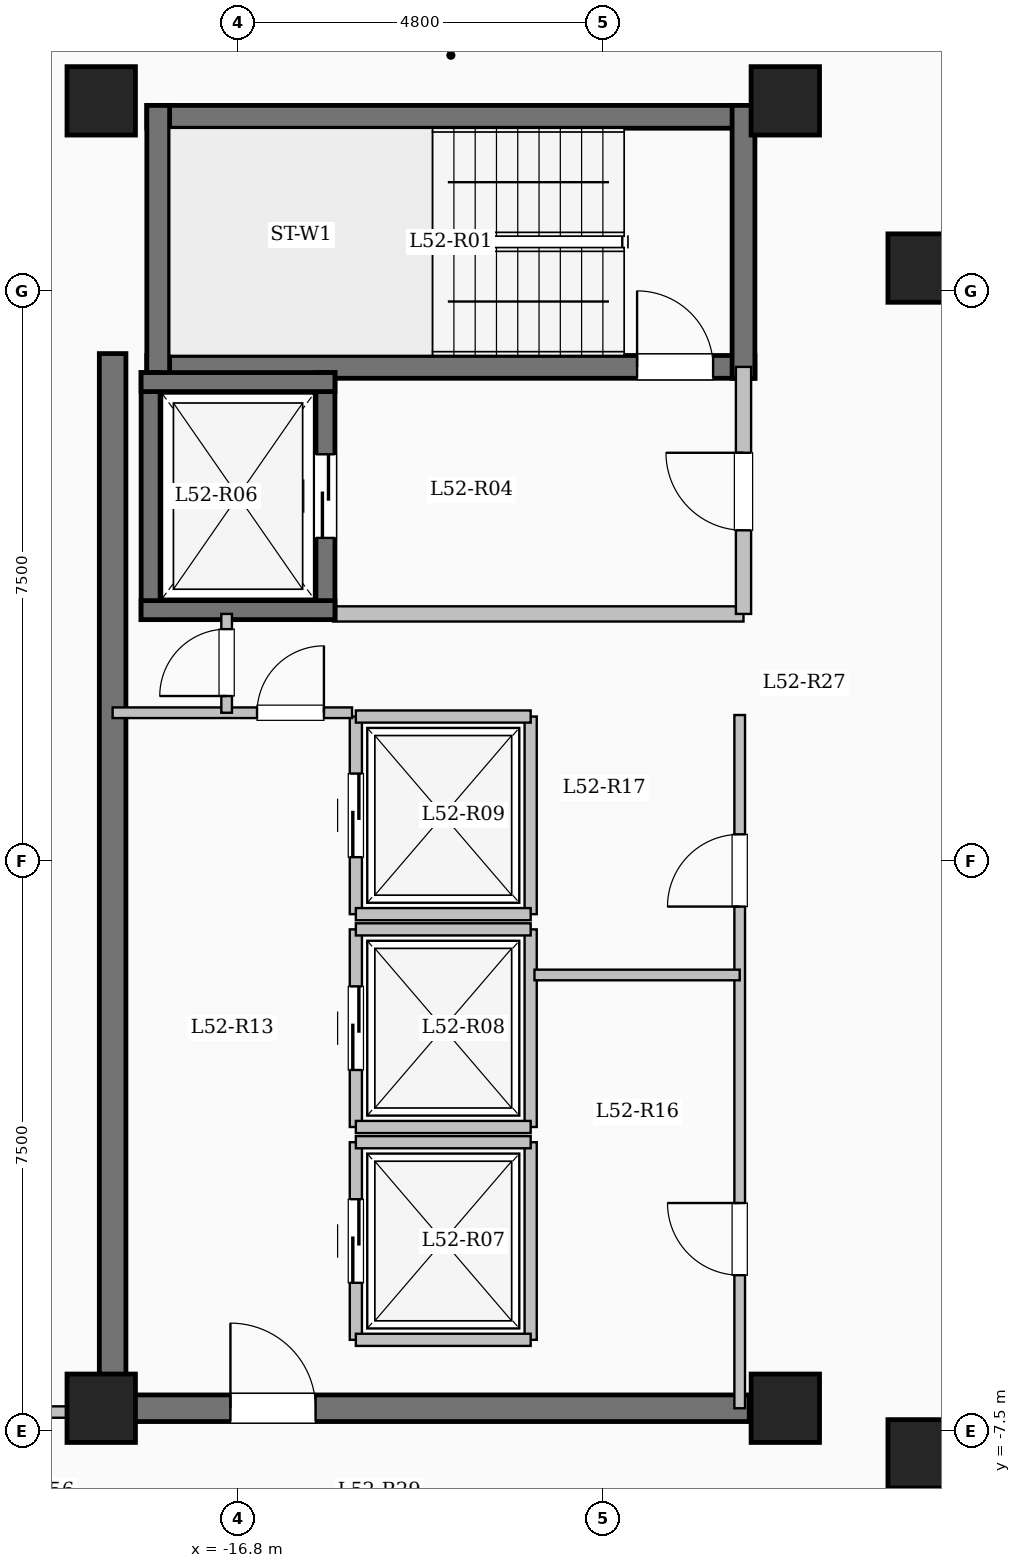
"""IFC4 building model, lengths in metres.
Left out: names, types, materials, properties, quantities, classifications, styles, units other than length and angle.
Written with IfcOpenShell. Run it as: python <this file> out.ifc"""

import sys

from ifc_helpers import new_model, si_unit, direction, frame, frame_2d, origin, origin_2d, place, context, subcontext, project, spatial, rectangle, extrude, element, fill, save


model = new_model("IFC4")
c1 = context("Model", 3, precision=1e-05, world=origin(), true_north=direction((0.0, 1.0)))
c2 = subcontext(c1, "Body", "Model", "MODEL_VIEW")
j1 = project(units=[si_unit("LENGTHUNIT", "METRE"), si_unit("PLANEANGLEUNIT", "RADIAN")], contexts=[c1])
p1 = place(None, origin())
s1 = spatial("IfcSite", under=j1, at=p1, CompositionType="ELEMENT")
p2 = place(p1, origin())
s2 = spatial("IfcBuilding", under=s1, at=p2, CompositionType="ELEMENT")
p3 = place(p2, frame((0.0, 0.0, 193.6)))
s3 = spatial("IfcBuildingStorey", under=s2, at=p3, CompositionType="ELEMENT", Elevation=193.6)
for number, where, z_axis, x_axis in (
    (1, (-7.8, -7.8, 0.0), (0.0, 0.0, 1.0), (1.0, 0.0, 0.0)),
    (2, (-7.8, 7.8, 0.0), (0.0, 0.0, 1.0), (1.0, 0.0, 0.0)),
    (3, (-9.6, -7.2, 0.0), (0.0, 0.0, 1.0), (1.0, 0.0, 0.0)),
    (4, (-9.6, 10.0, 0.0), (0.0, 0.0, 1.0), (1.0, 0.0, 0.0)),
    (5, (-18.6, -7.2, 0.0), (0.0, 0.0, 1.0), (1.0, 0.0, 0.0)),
    (6, (-18.6, 10.0, 0.0), (0.0, 0.0, 1.0), (1.0, 0.0, 0.0)),
):
    element("IfcColumn", number, at=place(p3, frame(where, z_axis=z_axis, x_axis=x_axis)), inside=s3, PredefinedType="COLUMN", context=c2, shape_type="SweptSolid", body=[
        extrude(rectangle(XDim=0.9, YDim=0.9, at=origin_2d()), origin(), (0.0, 0.0, 1.0), 3.35),
    ])
p4 = place(p3, frame((-18.0, 9.79, 0.0), z_axis=(0.0, 0.0, 1.0), x_axis=(1.0, 0.0, 0.0)))
e7 = element("IfcWall", 7, at=p4, inside=s3, PredefinedType="SHEAR", context=c2, shape_type="SweptSolid", body=[
    extrude(rectangle(XDim=8.0, YDim=0.3, at=frame_2d((4.0, 0.0))), origin(), (0.0, 0.0, 1.0), 3.35),
])
p5 = place(p3, frame((-18.0, 6.5, 0.0), z_axis=(0.0, 0.0, 1.0), x_axis=(1.0, 0.0, 0.0)))
e8 = element("IfcWall", 8, at=p5, inside=s3, PredefinedType="SHEAR", context=c2, shape_type="SweptSolid", body=[
    extrude(rectangle(XDim=8.0, YDim=0.3, at=frame_2d((4.0, 0.0))), origin(), (0.0, 0.0, 1.0), 3.35),
])
p6 = place(p5, frame((6.45, 0.0, 0.0)))
e9 = element("IfcOpeningElement", 9, at=p6, cuts=e8, PredefinedType="OPENING", context=c2, shape_type="SweptSolid", body=[
    extrude(rectangle(XDim=1.0, YDim=2.15, at=frame_2d((0.5, 1.075))), frame((0.0, 0.16, 0.0), z_axis=(0.0, -1.0, 0.0), x_axis=(1.0, 0.0, 0.0)), (0.0, 0.0, 1.0), 0.32),
])
for number, where, z_axis, x_axis in (
    (10, (-17.85, 6.35, 0.0), (0.0, 0.0, 1.0), (0.0, 1.0, 0.0)),
    (11, (-10.15, 6.35, 0.0), (0.0, 0.0, 1.0), (0.0, 1.0, 0.0)),
):
    element("IfcWall", number, at=place(p3, frame(where, z_axis=z_axis, x_axis=x_axis)), inside=s3, PredefinedType="SHEAR", context=c2, shape_type="SweptSolid", body=[
        extrude(rectangle(XDim=3.59, YDim=0.3, at=frame_2d((1.795, 0.0))), origin(), (0.0, 0.0, 1.0), 3.35),
    ])
p7 = place(p3, frame((-15.55, 3.25, 0.0), z_axis=(0.0, 0.0, 1.0), x_axis=(1.0, 0.0, 0.0)))
e12 = element("IfcWall", 12, at=p7, inside=s3, PredefinedType="SOLIDWALL", context=c2, shape_type="SweptSolid", body=[
    extrude(rectangle(XDim=5.4, YDim=0.2, at=frame_2d((2.7, 0.0))), origin(), (0.0, 0.0, 1.0), 3.1),
])
p8 = place(p3, frame((-10.15, 3.25, 0.0), z_axis=(0.0, 0.0, 1.0), x_axis=(0.0, 1.0, 0.0)))
e13 = element("IfcWall", 13, at=p8, inside=s3, PredefinedType="SOLIDWALL", context=c2, shape_type="SweptSolid", body=[
    extrude(rectangle(XDim=3.25, YDim=0.2, at=frame_2d((1.625, 0.0))), origin(), (0.0, 0.0, 1.0), 3.1),
])
p9 = place(p8, frame((1.1, 0.0, 0.0)))
e14 = element("IfcOpeningElement", 14, at=p9, cuts=e13, PredefinedType="OPENING", context=c2, shape_type="SweptSolid", body=[
    extrude(rectangle(XDim=1.02, YDim=2.15, at=frame_2d((0.51, 1.075))), frame((0.0, 0.11, 0.0), z_axis=(0.0, -1.0, 0.0), x_axis=(1.0, 0.0, 0.0)), (0.0, 0.0, 1.0), 0.22),
])
p10 = place(p3, frame((-17.95, 3.175, 0.0), z_axis=(0.0, 0.0, 1.0), x_axis=(0.0, 1.0, 0.0)))
e15 = element("IfcWall", 15, at=p10, inside=s3, PredefinedType="SHEAR", context=c2, shape_type="SweptSolid", body=[
    extrude(rectangle(XDim=3.25, YDim=0.25, at=frame_2d((1.625, 0.0))), origin(), (0.0, 0.0, 1.0), 3.35),
])
p11 = place(p3, frame((-15.65, 3.175, 0.0), z_axis=(0.0, 0.0, 1.0), x_axis=(0.0, 1.0, 0.0)))
e16 = element("IfcWall", 16, at=p11, inside=s3, PredefinedType="SHEAR", context=c2, shape_type="SweptSolid", body=[
    extrude(rectangle(XDim=3.25, YDim=0.25, at=frame_2d((1.625, 0.0))), origin(), (0.0, 0.0, 1.0), 3.35),
])
p12 = place(p11, frame((1.075, 0.0, 0.0)))
e17 = element("IfcOpeningElement", 17, at=p12, cuts=e16, PredefinedType="OPENING", context=c2, shape_type="SweptSolid", body=[
    extrude(rectangle(XDim=1.1, YDim=2.15, at=frame_2d((0.55, 1.075))), frame((0.0, 0.135, 0.0), z_axis=(0.0, -1.0, 0.0), x_axis=(1.0, 0.0, 0.0)), (0.0, 0.0, 1.0), 0.27),
])
for number, where, z_axis, x_axis in (
    (18, (-18.075, 3.3, 0.0), (0.0, 0.0, 1.0), (1.0, 0.0, 0.0)),
    (19, (-18.075, 6.3, 0.0), (0.0, 0.0, 1.0), (1.0, 0.0, 0.0)),
):
    element("IfcWall", number, at=place(p3, frame(where, z_axis=z_axis, x_axis=x_axis)), inside=s3, PredefinedType="SHEAR", context=c2, shape_type="SweptSolid", body=[
        extrude(rectangle(XDim=2.55, YDim=0.25, at=frame_2d((1.275, 0.0))), origin(), (0.0, 0.0, 1.0), 3.35),
    ])
p13 = place(p3, frame((-15.25, -6.3, 0.0), z_axis=(0.0, 0.0, 1.0), x_axis=(0.0, 1.0, 0.0)))
e20 = element("IfcWall", 20, at=p13, inside=s3, PredefinedType="SOLIDWALL", context=c2, shape_type="SweptSolid", body=[
    extrude(rectangle(XDim=2.6, YDim=0.16, at=frame_2d((1.3, 0.0))), origin(), (0.0, 0.0, 1.0), 3.1),
])
p14 = place(p13, frame((0.75, 0.0, 0.0)))
e21 = element("IfcOpeningElement", 21, at=p14, cuts=e20, PredefinedType="OPENING", context=c2, shape_type="SweptSolid", body=[
    extrude(rectangle(XDim=1.1, YDim=2.15, at=frame_2d((0.55, 1.075))), frame((0.0, 0.09, 0.0), z_axis=(0.0, -1.0, 0.0), x_axis=(1.0, 0.0, 0.0)), (0.0, 0.0, 1.0), 0.18),
])
p15 = place(p3, frame((-12.95, -6.3, 0.0), z_axis=(0.0, 0.0, 1.0), x_axis=(0.0, 1.0, 0.0)))
e22 = element("IfcWall", 22, at=p15, inside=s3, PredefinedType="SOLIDWALL", context=c2, shape_type="SweptSolid", body=[
    extrude(rectangle(XDim=2.6, YDim=0.16, at=frame_2d((1.3, 0.0))), origin(), (0.0, 0.0, 1.0), 3.1),
])
for number, where, z_axis, x_axis in (
    (23, (-15.25, -6.3, 0.0), (0.0, 0.0, 1.0), (1.0, 0.0, 0.0)),
    (24, (-15.25, -3.7, 0.0), (0.0, 0.0, 1.0), (1.0, 0.0, 0.0)),
):
    element("IfcWall", number, at=place(p3, frame(where, z_axis=z_axis, x_axis=x_axis)), inside=s3, PredefinedType="SOLIDWALL", context=c2, shape_type="SweptSolid", body=[
        extrude(rectangle(XDim=2.3, YDim=0.16, at=frame_2d((1.15, 0.0))), origin(), (0.0, 0.0, 1.0), 3.1),
    ])
p16 = place(p3, frame((-15.25, -3.5, 0.0), z_axis=(0.0, 0.0, 1.0), x_axis=(0.0, 1.0, 0.0)))
e25 = element("IfcWall", 25, at=p16, inside=s3, PredefinedType="SOLIDWALL", context=c2, shape_type="SweptSolid", body=[
    extrude(rectangle(XDim=2.6, YDim=0.16, at=frame_2d((1.3, 0.0))), origin(), (0.0, 0.0, 1.0), 3.1),
])
p17 = place(p16, frame((0.75, 0.0, 0.0)))
e26 = element("IfcOpeningElement", 26, at=p17, cuts=e25, PredefinedType="OPENING", context=c2, shape_type="SweptSolid", body=[
    extrude(rectangle(XDim=1.1, YDim=2.15, at=frame_2d((0.55, 1.075))), frame((0.0, 0.09, 0.0), z_axis=(0.0, -1.0, 0.0), x_axis=(1.0, 0.0, 0.0)), (0.0, 0.0, 1.0), 0.18),
])
p18 = place(p3, frame((-12.95, -3.5, 0.0), z_axis=(0.0, 0.0, 1.0), x_axis=(0.0, 1.0, 0.0)))
e27 = element("IfcWall", 27, at=p18, inside=s3, PredefinedType="SOLIDWALL", context=c2, shape_type="SweptSolid", body=[
    extrude(rectangle(XDim=2.6, YDim=0.16, at=frame_2d((1.3, 0.0))), origin(), (0.0, 0.0, 1.0), 3.1),
])
for number, where, z_axis, x_axis in (
    (28, (-15.25, -3.5, 0.0), (0.0, 0.0, 1.0), (1.0, 0.0, 0.0)),
    (29, (-15.25, -0.9, 0.0), (0.0, 0.0, 1.0), (1.0, 0.0, 0.0)),
):
    element("IfcWall", number, at=place(p3, frame(where, z_axis=z_axis, x_axis=x_axis)), inside=s3, PredefinedType="SOLIDWALL", context=c2, shape_type="SweptSolid", body=[
        extrude(rectangle(XDim=2.3, YDim=0.16, at=frame_2d((1.15, 0.0))), origin(), (0.0, 0.0, 1.0), 3.1),
    ])
p19 = place(p3, frame((-15.25, -0.7, 0.0), z_axis=(0.0, 0.0, 1.0), x_axis=(0.0, 1.0, 0.0)))
e30 = element("IfcWall", 30, at=p19, inside=s3, PredefinedType="SOLIDWALL", context=c2, shape_type="SweptSolid", body=[
    extrude(rectangle(XDim=2.6, YDim=0.16, at=frame_2d((1.3, 0.0))), origin(), (0.0, 0.0, 1.0), 3.1),
])
p20 = place(p19, frame((0.75, 0.0, 0.0)))
e31 = element("IfcOpeningElement", 31, at=p20, cuts=e30, PredefinedType="OPENING", context=c2, shape_type="SweptSolid", body=[
    extrude(rectangle(XDim=1.1, YDim=2.15, at=frame_2d((0.55, 1.075))), frame((0.0, 0.09, 0.0), z_axis=(0.0, -1.0, 0.0), x_axis=(1.0, 0.0, 0.0)), (0.0, 0.0, 1.0), 0.18),
])
p21 = place(p3, frame((-12.95, -0.7, 0.0), z_axis=(0.0, 0.0, 1.0), x_axis=(0.0, 1.0, 0.0)))
e32 = element("IfcWall", 32, at=p21, inside=s3, PredefinedType="SOLIDWALL", context=c2, shape_type="SweptSolid", body=[
    extrude(rectangle(XDim=2.6, YDim=0.16, at=frame_2d((1.3, 0.0))), origin(), (0.0, 0.0, 1.0), 3.1),
])
for number, where, z_axis, x_axis in (
    (33, (-15.25, -0.7, 0.0), (0.0, 0.0, 1.0), (1.0, 0.0, 0.0)),
    (34, (-15.25, 1.9, 0.0), (0.0, 0.0, 1.0), (1.0, 0.0, 0.0)),
):
    element("IfcWall", number, at=place(p3, frame(where, z_axis=z_axis, x_axis=x_axis)), inside=s3, PredefinedType="SOLIDWALL", context=c2, shape_type="SweptSolid", body=[
        extrude(rectangle(XDim=2.3, YDim=0.16, at=frame_2d((1.15, 0.0))), origin(), (0.0, 0.0, 1.0), 3.1),
    ])
p22 = place(p3, frame((-18.45, -7.375, 0.0), z_axis=(0.0, 0.0, 1.0), x_axis=(0.0, 1.0, 0.0)))
e35 = element("IfcWall", 35, at=p22, inside=s3, PredefinedType="SHEAR", context=c2, shape_type="SweptSolid", body=[
    extrude(rectangle(XDim=14.05, YDim=0.35, at=frame_2d((7.025, 0.0))), origin(), (0.0, 0.0, 1.0), 3.35),
])
p23 = place(p3, frame((-18.625, -7.2, 0.0), z_axis=(0.0, 0.0, 1.0), x_axis=(1.0, 0.0, 0.0)))
e36 = element("IfcWall", 36, at=p23, inside=s3, PredefinedType="SHEAR", context=c2, shape_type="SweptSolid", body=[
    extrude(rectangle(XDim=8.55, YDim=0.35, at=frame_2d((4.275, 0.0))), origin(), (0.0, 0.0, 1.0), 3.35),
])
p24 = place(p23, frame((1.725, 0.0, 0.0)))
e37 = element("IfcOpeningElement", 37, at=p24, cuts=e36, PredefinedType="OPENING", context=c2, shape_type="SweptSolid", body=[
    extrude(rectangle(XDim=1.12, YDim=2.15, at=frame_2d((0.56, 1.075))), frame((0.0, 0.185, 0.0), z_axis=(0.0, -1.0, 0.0), x_axis=(1.0, 0.0, 0.0)), (0.0, 0.0, 1.0), 0.37),
])
p25 = place(p3, frame((-18.45, 1.95, 0.0), z_axis=(0.0, 0.0, 1.0), x_axis=(1.0, 0.0, 0.0)))
e38 = element("IfcWall", 38, at=p25, inside=s3, PredefinedType="PARTITIONING", context=c2, shape_type="SweptSolid", body=[
    extrude(rectangle(XDim=3.15, YDim=0.14, at=frame_2d((1.575, 0.0))), origin(), (0.0, 0.0, 1.0), 3.1),
])
p26 = place(p25, frame((1.9, 0.0, 0.0)))
e39 = element("IfcOpeningElement", 39, at=p26, cuts=e38, PredefinedType="OPENING", context=c2, shape_type="SweptSolid", body=[
    extrude(rectangle(XDim=0.88, YDim=2.1, at=frame_2d((0.44, 1.05))), frame((0.0, 0.08, 0.0), z_axis=(0.0, -1.0, 0.0), x_axis=(1.0, 0.0, 0.0)), (0.0, 0.0, 1.0), 0.16),
])
p27 = place(p3, frame((-16.95, 1.95, 0.0), z_axis=(0.0, 0.0, 1.0), x_axis=(0.0, 1.0, 0.0)))
e40 = element("IfcWall", 40, at=p27, inside=s3, PredefinedType="PARTITIONING", context=c2, shape_type="SweptSolid", body=[
    extrude(rectangle(XDim=1.3, YDim=0.14, at=frame_2d((0.65, 0.0))), origin(), (0.0, 0.0, 1.0), 3.1),
])
p28 = place(p27, frame((0.22, 0.0, 0.0)))
e41 = element("IfcOpeningElement", 41, at=p28, cuts=e40, PredefinedType="OPENING", context=c2, shape_type="SweptSolid", body=[
    extrude(rectangle(XDim=0.88, YDim=2.1, at=frame_2d((0.44, 1.05))), frame((0.0, 0.08, 0.0), z_axis=(0.0, -1.0, 0.0), x_axis=(1.0, 0.0, 0.0)), (0.0, 0.0, 1.0), 0.16),
])
p29 = place(p3, frame((-10.2, -7.2, 0.0), z_axis=(0.0, 0.0, 1.0), x_axis=(0.0, 1.0, 0.0)))
e42 = element("IfcWall", 42, at=p29, inside=s3, PredefinedType="PARTITIONING", context=c2, shape_type="SweptSolid", body=[
    extrude(rectangle(XDim=9.12, YDim=0.14, at=frame_2d((4.56, 0.0))), origin(), (0.0, 0.0, 1.0), 3.1),
])
p30 = place(p29, frame((1.75, 0.0, 0.0)))
e43 = element("IfcOpeningElement", 43, at=p30, cuts=e42, PredefinedType="OPENING", context=c2, shape_type="SweptSolid", body=[
    extrude(rectangle(XDim=0.95, YDim=2.12, at=frame_2d((0.475, 1.06))), frame((0.0, 0.08, 0.0), z_axis=(0.0, -1.0, 0.0), x_axis=(1.0, 0.0, 0.0)), (0.0, 0.0, 1.0), 0.16),
])
p31 = place(p29, frame((6.6, 0.0, 0.0)))
e44 = element("IfcOpeningElement", 44, at=p31, cuts=e42, PredefinedType="OPENING", context=c2, shape_type="SweptSolid", body=[
    extrude(rectangle(XDim=0.95, YDim=2.12, at=frame_2d((0.475, 1.06))), frame((0.0, 0.08, 0.0), z_axis=(0.0, -1.0, 0.0), x_axis=(1.0, 0.0, 0.0)), (0.0, 0.0, 1.0), 0.16),
])
p32 = place(p3, frame((-12.9, -1.5, 0.0), z_axis=(0.0, 0.0, 1.0), x_axis=(1.0, 0.0, 0.0)))
e45 = element("IfcWall", 45, at=p32, inside=s3, PredefinedType="PARTITIONING", context=c2, shape_type="SweptSolid", body=[
    extrude(rectangle(XDim=2.7, YDim=0.14, at=frame_2d((1.35, 0.0))), origin(), (0.0, 0.0, 1.0), 3.1),
])
p33 = place(p3, frame((-23.58, -7.25, 0.0), z_axis=(0.0, 0.0, 1.0), x_axis=(1.0, 0.0, 0.0)))
e46 = element("IfcWall", 46, at=p33, inside=s3, PredefinedType="PARTITIONING", context=c2, shape_type="SweptSolid", body=[
    extrude(rectangle(XDim=5.13, YDim=0.15, at=frame_2d((2.565, 0.0))), origin(), (0.0, 0.0, 1.0), 3.1),
])
p34 = place(p33, frame((2.08, 0.0, 0.0)))
e47 = element("IfcOpeningElement", 47, at=p34, cuts=e46, PredefinedType="OPENING", context=c2, shape_type="SweptSolid", body=[
    extrude(rectangle(XDim=1.08, YDim=2.15, at=frame_2d((0.54, 1.075))), frame((0.0, 0.085, 0.0), z_axis=(0.0, -1.0, 0.0), x_axis=(1.0, 0.0, 0.0)), (0.0, 0.0, 1.0), 0.17),
])
p35 = place(p6, origin())
e48 = element("IfcDoor", 48, at=p35, inside=s3, OperationType="SINGLE_SWING_LEFT", PredefinedType="DOOR", context=c2, shape_type="SweptSolid", body=[
    extrude(rectangle(XDim=1.0, YDim=2.15, at=frame_2d((0.5, 1.075))), frame((0.0, 0.025, 0.0), z_axis=(0.0, -1.0, 0.0), x_axis=(1.0, 0.0, 0.0)), (0.0, 0.0, 1.0), 0.05),
])
fill(e9, e48)
p36 = place(p9, origin())
e49 = element("IfcDoor", 49, at=p36, inside=s3, OperationType="SINGLE_SWING_RIGHT", PredefinedType="DOOR", context=c2, shape_type="SweptSolid", body=[
    extrude(rectangle(XDim=1.02, YDim=2.15, at=frame_2d((0.51, 1.075))), frame((0.0, 0.025, 0.0), z_axis=(0.0, -1.0, 0.0), x_axis=(1.0, 0.0, 0.0)), (0.0, 0.0, 1.0), 0.05),
])
fill(e14, e49)
p37 = place(p12, origin())
e50 = element("IfcDoor", 50, at=p37, inside=s3, OperationType="SLIDING_TO_LEFT", PredefinedType="DOOR", context=c2, shape_type="SweptSolid", body=[
    extrude(rectangle(XDim=1.1, YDim=2.15, at=frame_2d((0.55, 1.075))), frame((0.0, 0.025, 0.0), z_axis=(0.0, -1.0, 0.0), x_axis=(1.0, 0.0, 0.0)), (0.0, 0.0, 1.0), 0.05),
])
fill(e17, e50)
p38 = place(p14, origin())
e51 = element("IfcDoor", 51, at=p38, inside=s3, OperationType="SLIDING_TO_LEFT", PredefinedType="DOOR", context=c2, shape_type="SweptSolid", body=[
    extrude(rectangle(XDim=1.1, YDim=2.15, at=frame_2d((0.55, 1.075))), frame((0.0, 0.025, 0.0), z_axis=(0.0, -1.0, 0.0), x_axis=(1.0, 0.0, 0.0)), (0.0, 0.0, 1.0), 0.05),
])
fill(e21, e51)
p39 = place(p17, origin())
e52 = element("IfcDoor", 52, at=p39, inside=s3, OperationType="SLIDING_TO_LEFT", PredefinedType="DOOR", context=c2, shape_type="SweptSolid", body=[
    extrude(rectangle(XDim=1.1, YDim=2.15, at=frame_2d((0.55, 1.075))), frame((0.0, 0.025, 0.0), z_axis=(0.0, -1.0, 0.0), x_axis=(1.0, 0.0, 0.0)), (0.0, 0.0, 1.0), 0.05),
])
fill(e26, e52)
p40 = place(p20, origin())
e53 = element("IfcDoor", 53, at=p40, inside=s3, OperationType="SLIDING_TO_LEFT", PredefinedType="DOOR", context=c2, shape_type="SweptSolid", body=[
    extrude(rectangle(XDim=1.1, YDim=2.15, at=frame_2d((0.55, 1.075))), frame((0.0, 0.025, 0.0), z_axis=(0.0, -1.0, 0.0), x_axis=(1.0, 0.0, 0.0)), (0.0, 0.0, 1.0), 0.05),
])
fill(e31, e53)
p41 = place(p24, origin())
e54 = element("IfcDoor", 54, at=p41, inside=s3, OperationType="SINGLE_SWING_LEFT", PredefinedType="DOOR", context=c2, shape_type="SweptSolid", body=[
    extrude(rectangle(XDim=1.12, YDim=2.15, at=frame_2d((0.56, 1.075))), frame((0.0, 0.025, 0.0), z_axis=(0.0, -1.0, 0.0), x_axis=(1.0, 0.0, 0.0)), (0.0, 0.0, 1.0), 0.05),
])
fill(e37, e54)
p42 = place(p26, origin())
e55 = element("IfcDoor", 55, at=p42, inside=s3, OperationType="SINGLE_SWING_RIGHT", PredefinedType="DOOR", context=c2, shape_type="SweptSolid", body=[
    extrude(rectangle(XDim=0.88, YDim=2.1, at=frame_2d((0.44, 1.05))), frame((0.0, 0.025, 0.0), z_axis=(0.0, -1.0, 0.0), x_axis=(1.0, 0.0, 0.0)), (0.0, 0.0, 1.0), 0.05),
])
fill(e39, e55)
p43 = place(p28, origin())
e56 = element("IfcDoor", 56, at=p43, inside=s3, OperationType="SINGLE_SWING_LEFT", PredefinedType="DOOR", context=c2, shape_type="SweptSolid", body=[
    extrude(rectangle(XDim=0.88, YDim=2.1, at=frame_2d((0.44, 1.05))), frame((0.0, 0.025, 0.0), z_axis=(0.0, -1.0, 0.0), x_axis=(1.0, 0.0, 0.0)), (0.0, 0.0, 1.0), 0.05),
])
fill(e41, e56)
p44 = place(p30, origin())
e57 = element("IfcDoor", 57, at=p44, inside=s3, OperationType="SINGLE_SWING_RIGHT", PredefinedType="DOOR", context=c2, shape_type="SweptSolid", body=[
    extrude(rectangle(XDim=0.95, YDim=2.12, at=frame_2d((0.475, 1.06))), frame((0.0, 0.025, 0.0), z_axis=(0.0, -1.0, 0.0), x_axis=(1.0, 0.0, 0.0)), (0.0, 0.0, 1.0), 0.05),
])
fill(e43, e57)
p45 = place(p31, origin())
e58 = element("IfcDoor", 58, at=p45, inside=s3, OperationType="SINGLE_SWING_LEFT", PredefinedType="DOOR", context=c2, shape_type="SweptSolid", body=[
    extrude(rectangle(XDim=0.95, YDim=2.12, at=frame_2d((0.475, 1.06))), frame((0.0, 0.025, 0.0), z_axis=(0.0, -1.0, 0.0), x_axis=(1.0, 0.0, 0.0)), (0.0, 0.0, 1.0), 0.05),
])
fill(e44, e58)
save(model, sys.argv[1])
